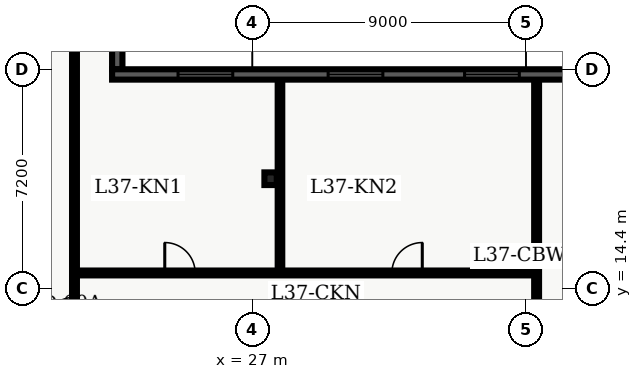
"""IFC4 building model, lengths in metres.
Left out: names, types, materials, properties, quantities, classifications, styles, units other than length and angle.
Written with IfcOpenShell. Run it as: python <this file> out.ifc"""

import sys

from ifc_helpers import new_model, entity, si_unit, converted_unit, direction, frame, origin_with_axes, origin_2d_with_axis, place, context, subcontext, project, spatial, polyline, rectangle, i_section, outline, extrude, element, fill, save


model = new_model("IFC4")
c1 = context("Model", 3, precision=1e-05, world=origin_with_axes(), true_north=direction((0.0, 1.0)))
c2 = subcontext(c1, "Body", "Model", "MODEL_VIEW")
j1 = project(units=[si_unit("LENGTHUNIT", "METRE"), converted_unit("PLANEANGLEUNIT", "DEGREE", entity("IfcPlaneAngleMeasure", 0.017), si_unit("PLANEANGLEUNIT", "RADIAN"), dimensions=[0, 0, 0, 0, 0, 0, 0])], contexts=[c1])
p1 = place(None, origin_with_axes())
s1 = spatial("IfcSite", under=j1, at=p1, CompositionType="ELEMENT")
p2 = place(p1, origin_with_axes())
s2 = spatial("IfcBuilding", under=s1, at=p2, CompositionType="ELEMENT")
p3 = place(p2, frame((0.0, 0.0, 152.4), z_axis=(0.0, 0.0, 1.0), x_axis=(1.0, 0.0, 0.0)))
s3 = spatial("IfcBuildingStorey", under=s2, at=p3, CompositionType="ELEMENT", Elevation=152.4)
p4 = place(p3, frame((27.6, 18.0, 0.0), z_axis=(0.0, 0.0, 1.0), x_axis=(1.0, 0.0, 0.0)))
e1 = element("IfcColumn", 1, at=p4, inside=s3, PredefinedType="COLUMN", context=c2, shape_type="SweptSolid", body=[
    extrude(i_section(OverallWidth=0.406, OverallDepth=0.416, WebThickness=0.03, FlangeThickness=0.048, FilletRadius=0.022, at=origin_2d_with_axis()), origin_with_axes(), (0.0, 0.0, 1.0), 3.9),
])
p5 = place(p3, frame((21.15, 7.8, 0.0), z_axis=(0.0, 0.0, 1.0), x_axis=(0.0, 1.0, 0.0)))
e2 = element("IfcWall", 2, at=p5, inside=s3, PredefinedType="PARTITIONING", context=c2, shape_type="SweptSolid", body=[
    extrude(outline(polyline([(0.0, -0.08), (32.7, -0.08), (32.7, 0.08), (0.0, 0.08), (0.0, -0.08)])), origin_with_axes(), (0.0, 0.0, 1.0), 2.7),
])
p6 = place(p5, frame((5.775, 0.0, 0.0), z_axis=(0.0, 0.0, 1.0), x_axis=(1.0, 0.0, 0.0)))
e3 = element("IfcOpeningElement", 3, at=p6, cuts=e2, PredefinedType="OPENING", context=c2, shape_type="SweptSolid", body=[
    extrude(rectangle(XDim=1.05, YDim=0.18, at=origin_2d_with_axis()), origin_with_axes(), (0.0, 0.0, 1.0), 2.15),
])
p7 = place(p3, frame((21.15, 14.9, 0.0), z_axis=(0.0, 0.0, 1.0), x_axis=(1.0, 0.0, 0.0)))
e4 = element("IfcWall", 4, at=p7, inside=s3, PredefinedType="PARTITIONING", context=c2, shape_type="SweptSolid", body=[
    extrude(outline(polyline([(0.0, -0.08), (15.2, -0.08), (15.2, 0.08), (0.0, 0.08), (0.0, -0.08)])), origin_with_axes(), (0.0, 0.0, 1.0), 2.7),
])
p8 = place(p7, frame((3.47, 0.0, 0.0), z_axis=(0.0, 0.0, 1.0), x_axis=(1.0, 0.0, 0.0)))
e5 = element("IfcOpeningElement", 5, at=p8, cuts=e4, PredefinedType="OPENING", context=c2, shape_type="SweptSolid", body=[
    extrude(rectangle(XDim=1.0, YDim=0.18, at=origin_2d_with_axis()), origin_with_axes(), (0.0, 0.0, 1.0), 2.15),
])
p9 = place(p7, frame((10.94, 0.0, 0.0), z_axis=(0.0, 0.0, 1.0), x_axis=(1.0, 0.0, 0.0)))
e6 = element("IfcOpeningElement", 6, at=p9, cuts=e4, PredefinedType="OPENING", context=c2, shape_type="SweptSolid", body=[
    extrude(rectangle(XDim=1.0, YDim=0.18, at=origin_2d_with_axis()), origin_with_axes(), (0.0, 0.0, 1.0), 2.15),
])
p10 = place(p3, frame((36.35, 4.35, 0.0), z_axis=(0.0, 0.0, 1.0), x_axis=(0.0, 1.0, 0.0)))
e7 = element("IfcWall", 7, at=p10, inside=s3, PredefinedType="PARTITIONING", context=c2, shape_type="SweptSolid", body=[
    extrude(outline(polyline([(0.0, -0.08), (16.95, -0.08), (16.95, 0.08), (0.0, 0.08), (0.0, -0.08)])), origin_with_axes(), (0.0, 0.0, 1.0), 2.7),
])
p11 = place(p3, frame((27.909, 15.02, 0.0), z_axis=(0.0, 0.0, 1.0), x_axis=(0.0, 1.0, 0.0)))
e8 = element("IfcWall", 8, at=p11, inside=s3, PredefinedType="PARTITIONING", context=c2, shape_type="SweptSolid", body=[
    extrude(outline(polyline([(0.0, -0.075), (6.245, -0.075), (6.245, 0.075), (0.0, 0.075), (0.0, -0.075)])), origin_with_axes(), (0.0, 0.0, 1.0), 2.7),
])
p12 = place(p3, frame((22.557, 46.1, 0.0), z_axis=(0.0, 0.0, 1.0), x_axis=(0.0, -1.0, 0.0)))
e9 = element("IfcWall", 9, at=p12, inside=s3, PredefinedType="SOLIDWALL", context=c2, shape_type="SweptSolid", body=[
    extrude(outline(polyline([(0.0, -0.17), (24.5, -0.17), (24.5, 0.17), (0.0, 0.17), (0.0, -0.17)])), origin_with_axes(), (0.0, 0.0, 1.0), 3.66),
])
p13 = place(p12, frame((2.93, 0.0, 0.45), z_axis=(0.0, 0.0, 1.0), x_axis=(1.0, 0.0, 0.0)))
e10 = element("IfcOpeningElement", 10, at=p13, cuts=e9, PredefinedType="OPENING", context=c2, shape_type="SweptSolid", body=[
    extrude(rectangle(XDim=1.6, YDim=0.36, at=origin_2d_with_axis()), origin_with_axes(), (0.0, 0.0, 1.0), 2.2),
])
p14 = place(p12, frame((7.59, 0.0, 0.45), z_axis=(0.0, 0.0, 1.0), x_axis=(1.0, 0.0, 0.0)))
e11 = element("IfcOpeningElement", 11, at=p14, cuts=e9, PredefinedType="OPENING", context=c2, shape_type="SweptSolid", body=[
    extrude(rectangle(XDim=1.6, YDim=0.36, at=origin_2d_with_axis()), origin_with_axes(), (0.0, 0.0, 1.0), 2.2),
])
p15 = place(p12, frame((12.25, 0.0, 0.45), z_axis=(0.0, 0.0, 1.0), x_axis=(1.0, 0.0, 0.0)))
e12 = element("IfcOpeningElement", 12, at=p15, cuts=e9, PredefinedType="OPENING", context=c2, shape_type="SweptSolid", body=[
    extrude(rectangle(XDim=1.6, YDim=0.36, at=origin_2d_with_axis()), origin_with_axes(), (0.0, 0.0, 1.0), 2.2),
])
p16 = place(p12, frame((16.91, 0.0, 0.45), z_axis=(0.0, 0.0, 1.0), x_axis=(1.0, 0.0, 0.0)))
e13 = element("IfcOpeningElement", 13, at=p16, cuts=e9, PredefinedType="OPENING", context=c2, shape_type="SweptSolid", body=[
    extrude(rectangle(XDim=1.6, YDim=0.36, at=origin_2d_with_axis()), origin_with_axes(), (0.0, 0.0, 1.0), 2.2),
])
p17 = place(p12, frame((21.57, 0.0, 0.45), z_axis=(0.0, 0.0, 1.0), x_axis=(1.0, 0.0, 0.0)))
e14 = element("IfcOpeningElement", 14, at=p17, cuts=e9, PredefinedType="OPENING", context=c2, shape_type="SweptSolid", body=[
    extrude(rectangle(XDim=1.6, YDim=0.36, at=origin_2d_with_axis()), origin_with_axes(), (0.0, 0.0, 1.0), 2.2),
])
p18 = place(p3, frame((22.387, 21.43, 0.0), z_axis=(0.0, 0.0, 1.0), x_axis=(1.0, 0.0, 0.0)))
e15 = element("IfcWall", 15, at=p18, inside=s3, PredefinedType="SOLIDWALL", context=c2, shape_type="SweptSolid", body=[
    extrude(outline(polyline([(0.0, -0.17), (16.013, -0.17), (16.013, 0.17), (0.0, 0.17), (0.0, -0.17)])), origin_with_axes(), (0.0, 0.0, 1.0), 3.66),
])
p19 = place(p18, frame((3.069, 0.0, 0.45), z_axis=(0.0, 0.0, 1.0), x_axis=(1.0, 0.0, 0.0)))
e16 = element("IfcOpeningElement", 16, at=p19, cuts=e15, PredefinedType="OPENING", context=c2, shape_type="SweptSolid", body=[
    extrude(rectangle(XDim=1.8, YDim=0.36, at=origin_2d_with_axis()), origin_with_axes(), (0.0, 0.0, 1.0), 2.1),
])
p20 = place(p18, frame((8.006, 0.0, 0.45), z_axis=(0.0, 0.0, 1.0), x_axis=(1.0, 0.0, 0.0)))
e17 = element("IfcOpeningElement", 17, at=p20, cuts=e15, PredefinedType="OPENING", context=c2, shape_type="SweptSolid", body=[
    extrude(rectangle(XDim=1.8, YDim=0.36, at=origin_2d_with_axis()), origin_with_axes(), (0.0, 0.0, 1.0), 2.1),
])
p21 = place(p18, frame((12.494, 0.0, 0.45), z_axis=(0.0, 0.0, 1.0), x_axis=(1.0, 0.0, 0.0)))
e18 = element("IfcOpeningElement", 18, at=p21, cuts=e15, PredefinedType="OPENING", context=c2, shape_type="SweptSolid", body=[
    extrude(rectangle(XDim=1.8, YDim=0.36, at=origin_2d_with_axis()), origin_with_axes(), (0.0, 0.0, 1.0), 2.1),
])
p22 = place(p5, frame((5.775, 0.0, 0.0), z_axis=(0.0, 0.0, 1.0), x_axis=(1.0, 0.0, 0.0)))
e19 = element("IfcDoor", 19, at=p22, inside=s3, OperationType="SINGLE_SWING_LEFT", PredefinedType="DOOR", context=c2, shape_type="SweptSolid", body=[
    extrude(rectangle(XDim=1.05, YDim=0.09, at=origin_2d_with_axis()), origin_with_axes(), (0.0, 0.0, 1.0), 2.15),
])
fill(e3, e19)
p23 = place(p7, frame((3.47, 0.0, 0.0), z_axis=(0.0, 0.0, 1.0), x_axis=(1.0, 0.0, 0.0)))
e20 = element("IfcDoor", 20, at=p23, inside=s3, OperationType="SINGLE_SWING_LEFT", PredefinedType="DOOR", context=c2, shape_type="SweptSolid", body=[
    extrude(rectangle(XDim=1.0, YDim=0.09, at=origin_2d_with_axis()), origin_with_axes(), (0.0, 0.0, 1.0), 2.15),
])
fill(e5, e20)
p24 = place(p7, frame((10.94, 0.0, 0.0), z_axis=(0.0, 0.0, 1.0), x_axis=(1.0, 0.0, 0.0)))
e21 = element("IfcDoor", 21, at=p24, inside=s3, OperationType="SINGLE_SWING_RIGHT", PredefinedType="DOOR", context=c2, shape_type="SweptSolid", body=[
    extrude(rectangle(XDim=1.0, YDim=0.09, at=origin_2d_with_axis()), origin_with_axes(), (0.0, 0.0, 1.0), 2.15),
])
fill(e6, e21)
p25 = place(p18, frame((3.069, 0.0, 0.45), z_axis=(0.0, 0.0, 1.0), x_axis=(1.0, 0.0, 0.0)))
e22 = element("IfcWindow", 22, at=p25, inside=s3, PredefinedType="WINDOW", context=c2, shape_type="SweptSolid", body=[
    extrude(rectangle(XDim=1.8, YDim=0.09, at=origin_2d_with_axis()), origin_with_axes(), (0.0, 0.0, 1.0), 2.1),
])
fill(e16, e22)
p26 = place(p18, frame((8.006, 0.0, 0.45), z_axis=(0.0, 0.0, 1.0), x_axis=(1.0, 0.0, 0.0)))
e23 = element("IfcWindow", 23, at=p26, inside=s3, PredefinedType="WINDOW", context=c2, shape_type="SweptSolid", body=[
    extrude(rectangle(XDim=1.8, YDim=0.09, at=origin_2d_with_axis()), origin_with_axes(), (0.0, 0.0, 1.0), 2.1),
])
fill(e17, e23)
p27 = place(p18, frame((12.494, 0.0, 0.45), z_axis=(0.0, 0.0, 1.0), x_axis=(1.0, 0.0, 0.0)))
e24 = element("IfcWindow", 24, at=p27, inside=s3, PredefinedType="WINDOW", context=c2, shape_type="SweptSolid", body=[
    extrude(rectangle(XDim=1.8, YDim=0.09, at=origin_2d_with_axis()), origin_with_axes(), (0.0, 0.0, 1.0), 2.1),
])
fill(e18, e24)
save(model, sys.argv[1])
